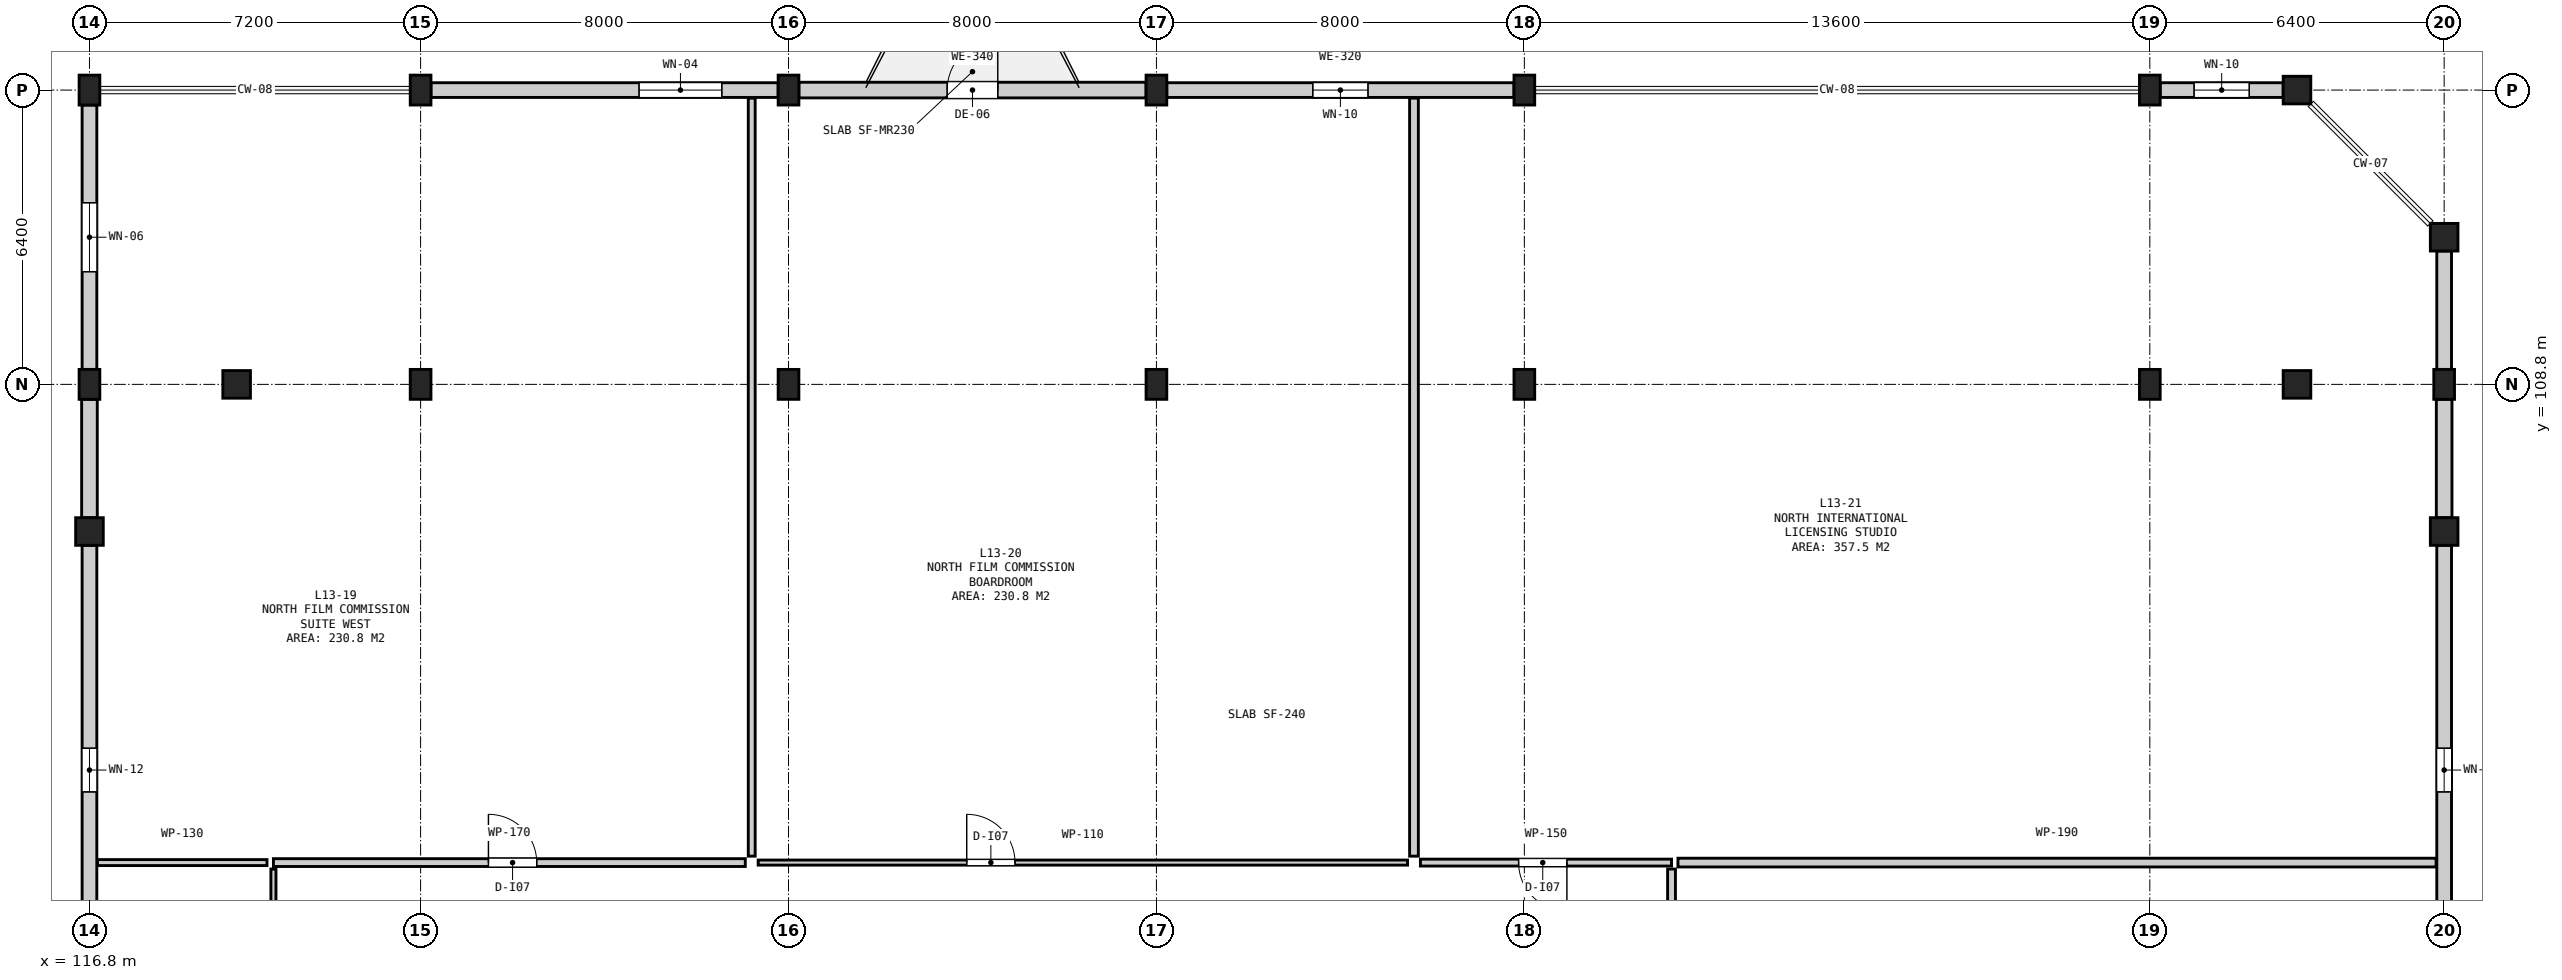
"""IFC4 building model, lengths in metres.
Left out: names, types, materials, properties, quantities, classifications, styles, units other than length and angle.
Written with IfcOpenShell. Run it as: python <this file> out.ifc"""

import sys

from ifc_helpers import new_model, si_unit, direction, frame, frame_2d, origin, origin_2d, place, context, subcontext, project, spatial, rectangle, circle, extrude, element, fill, save


model = new_model("IFC4")
c1 = context("Model", 3, precision=1e-05, world=origin(), true_north=direction((0.0, 1.0)))
c2 = subcontext(c1, "Body", "Model", "MODEL_VIEW")
j1 = project(units=[si_unit("LENGTHUNIT", "METRE"), si_unit("PLANEANGLEUNIT", "RADIAN")], contexts=[c1])
p1 = place(None, origin())
s1 = spatial("IfcSite", under=j1, at=p1, CompositionType="ELEMENT")
p2 = place(p1, origin())
s2 = spatial("IfcBuilding", under=s1, at=p2, CompositionType="ELEMENT")
p3 = place(p2, frame((0.0, 0.0, 54.8)))
s3 = spatial("IfcBuildingStorey", under=s2, at=p3, CompositionType="ELEMENT", Elevation=54.8)
p4 = place(p3, frame((116.8, 105.6, 0.0), z_axis=(0.0, 0.0, 1.0), x_axis=(1.0, 0.0, 0.0)))
e1 = element("IfcColumn", 1, at=p4, inside=s3, PredefinedType="COLUMN", context=c2, shape_type="SweptSolid", body=[
    extrude(circle(Radius=0.3, at=origin_2d()), origin(), (0.0, 0.0, 1.0), 3.9),
])
for number, where, z_axis, x_axis in (
    (2, (116.8, 108.8, 0.0), (0.0, 0.0, 1.0), (1.0, 0.0, 0.0)),
    (3, (116.8, 115.2, 0.0), (0.0, 0.0, 1.0), (1.0, 0.0, 0.0)),
):
    element("IfcColumn", number, at=place(p3, frame(where, z_axis=z_axis, x_axis=x_axis)), inside=s3, PredefinedType="COLUMN", context=c2, shape_type="SweptSolid", body=[
        extrude(rectangle(XDim=0.45, YDim=0.65, at=origin_2d()), origin(), (0.0, 0.0, 1.0), 3.9),
    ])
p5 = place(p3, frame((120.0, 108.8, 0.0), z_axis=(0.0, 0.0, 1.0), x_axis=(1.0, 0.0, 0.0)))
e4 = element("IfcColumn", 4, at=p5, inside=s3, PredefinedType="COLUMN", context=c2, shape_type="SweptSolid", body=[
    extrude(circle(Radius=0.3, at=origin_2d()), origin(), (0.0, 0.0, 1.0), 3.9),
])
for number, where, z_axis, x_axis in (
    (5, (124.0, 108.8, 0.0), (0.0, 0.0, 1.0), (1.0, 0.0, 0.0)),
    (6, (124.0, 115.2, 0.0), (0.0, 0.0, 1.0), (1.0, 0.0, 0.0)),
    (7, (132.0, 108.8, 0.0), (0.0, 0.0, 1.0), (1.0, 0.0, 0.0)),
    (8, (132.0, 115.2, 0.0), (0.0, 0.0, 1.0), (1.0, 0.0, 0.0)),
    (9, (140.0, 108.8, 0.0), (0.0, 0.0, 1.0), (1.0, 0.0, 0.0)),
    (10, (140.0, 115.2, 0.0), (0.0, 0.0, 1.0), (1.0, 0.0, 0.0)),
    (11, (148.0, 108.8, 0.0), (0.0, 0.0, 1.0), (1.0, 0.0, 0.0)),
    (12, (148.0, 115.2, 0.0), (0.0, 0.0, 1.0), (1.0, 0.0, 0.0)),
    (13, (161.6, 108.8, 0.0), (0.0, 0.0, 1.0), (1.0, 0.0, 0.0)),
    (14, (161.6, 115.2, 0.0), (0.0, 0.0, 1.0), (1.0, 0.0, 0.0)),
):
    element("IfcColumn", number, at=place(p3, frame(where, z_axis=z_axis, x_axis=x_axis)), inside=s3, PredefinedType="COLUMN", context=c2, shape_type="SweptSolid", body=[
        extrude(rectangle(XDim=0.45, YDim=0.65, at=origin_2d()), origin(), (0.0, 0.0, 1.0), 3.9),
    ])
for number, where, z_axis, x_axis in (
    (15, (164.8, 108.8, 0.0), (0.0, 0.0, 1.0), (1.0, 0.0, 0.0)),
    (16, (164.8, 115.2, 0.0), (0.0, 0.0, 1.0), (1.0, 0.0, 0.0)),
    (17, (168.0, 105.6, 0.0), (0.0, 0.0, 1.0), (1.0, 0.0, 0.0)),
):
    element("IfcColumn", number, at=place(p3, frame(where, z_axis=z_axis, x_axis=x_axis)), inside=s3, PredefinedType="COLUMN", context=c2, shape_type="SweptSolid", body=[
        extrude(circle(Radius=0.3, at=origin_2d()), origin(), (0.0, 0.0, 1.0), 3.9),
    ])
p6 = place(p3, frame((168.0, 108.8, 0.0), z_axis=(0.0, 0.0, 1.0), x_axis=(1.0, 0.0, 0.0)))
e18 = element("IfcColumn", 18, at=p6, inside=s3, PredefinedType="COLUMN", context=c2, shape_type="SweptSolid", body=[
    extrude(rectangle(XDim=0.45, YDim=0.65, at=origin_2d()), origin(), (0.0, 0.0, 1.0), 3.9),
])
p7 = place(p3, frame((168.0, 112.0, 0.0), z_axis=(0.0, 0.0, 1.0), x_axis=(1.0, 0.0, 0.0)))
e19 = element("IfcColumn", 19, at=p7, inside=s3, PredefinedType="COLUMN", context=c2, shape_type="SweptSolid", body=[
    extrude(circle(Radius=0.3, at=origin_2d()), origin(), (0.0, 0.0, 1.0), 3.9),
])
p8 = place(p3, frame((168.0, 95.525, 0.0), z_axis=(0.0, 0.0, 1.0), x_axis=(0.0, 1.0, 0.0)))
e20 = element("IfcWall", 20, at=p8, inside=s3, PredefinedType="SOLIDWALL", context=c2, shape_type="SweptSolid", body=[
    extrude(rectangle(XDim=9.775, YDim=0.32, at=frame_2d((4.888, 0.0))), origin(), (0.0, 0.0, 1.0), 2.645),
])
p9 = place(p8, frame((4.413, 0.0, 0.8)))
e21 = element("IfcOpeningElement", 21, at=p9, cuts=e20, PredefinedType="OPENING", context=c2, shape_type="SweptSolid", body=[
    extrude(rectangle(XDim=0.95, YDim=1.45, at=frame_2d((0.475, 0.725))), frame((0.0, 0.172, 0.0), z_axis=(0.0, -1.0, 0.0), x_axis=(1.0, 0.0, 0.0)), (0.0, 0.0, 1.0), 0.344),
])
p10 = place(p3, frame((168.0, 105.9, 0.0), z_axis=(0.0, 0.0, 1.0), x_axis=(0.0, 1.0, 0.0)))
e22 = element("IfcWall", 22, at=p10, inside=s3, PredefinedType="SOLIDWALL", context=c2, shape_type="SweptSolid", body=[
    extrude(rectangle(XDim=2.575, YDim=0.34, at=frame_2d((1.288, 0.0))), origin(), (0.0, 0.0, 1.0), 2.645),
])
p11 = place(p3, frame((168.0, 109.125, 0.0), z_axis=(0.0, 0.0, 1.0), x_axis=(0.0, 1.0, 0.0)))
e23 = element("IfcWall", 23, at=p11, inside=s3, PredefinedType="SOLIDWALL", context=c2, shape_type="SweptSolid", body=[
    extrude(rectangle(XDim=2.575, YDim=0.32, at=frame_2d((1.288, 0.0))), origin(), (0.0, 0.0, 1.0), 3.06),
])
p12 = place(p3, frame((164.5, 115.2, 0.0), z_axis=(0.0, 0.0, 1.0), x_axis=(-1.0, 0.0, 0.0)))
e24 = element("IfcWall", 24, at=p12, inside=s3, PredefinedType="SOLIDWALL", context=c2, shape_type="SweptSolid", body=[
    extrude(rectangle(XDim=2.675, YDim=0.32, at=frame_2d((1.337, 0.0))), origin(), (0.0, 0.0, 1.0), 3.06),
])
p13 = place(p12, frame((0.738, 0.0, 0.9)))
e25 = element("IfcOpeningElement", 25, at=p13, cuts=e24, PredefinedType="OPENING", context=c2, shape_type="SweptSolid", body=[
    extrude(rectangle(XDim=1.2, YDim=1.7, at=frame_2d((0.6, 0.85))), frame((0.0, 0.172, 0.0), z_axis=(0.0, -1.0, 0.0), x_axis=(1.0, 0.0, 0.0)), (0.0, 0.0, 1.0), 0.344),
])
p14 = place(p3, frame((147.775, 115.2, 0.0), z_axis=(0.0, 0.0, 1.0), x_axis=(-1.0, 0.0, 0.0)))
e26 = element("IfcWall", 26, at=p14, inside=s3, PredefinedType="SOLIDWALL", context=c2, shape_type="SweptSolid", body=[
    extrude(rectangle(XDim=7.55, YDim=0.32, at=frame_2d((3.775, 0.0))), origin(), (0.0, 0.0, 1.0), 3.06),
])
p15 = place(p14, frame((3.175, 0.0, 0.9)))
e27 = element("IfcOpeningElement", 27, at=p15, cuts=e26, PredefinedType="OPENING", context=c2, shape_type="SweptSolid", body=[
    extrude(rectangle(XDim=1.2, YDim=1.7, at=frame_2d((0.6, 0.85))), frame((0.0, 0.172, 0.0), z_axis=(0.0, -1.0, 0.0), x_axis=(1.0, 0.0, 0.0)), (0.0, 0.0, 1.0), 0.344),
])
p16 = place(p3, frame((139.775, 115.2, 0.0), z_axis=(0.0, 0.0, 1.0), x_axis=(-1.0, 0.0, 0.0)))
e28 = element("IfcWall", 28, at=p16, inside=s3, PredefinedType="SOLIDWALL", context=c2, shape_type="SweptSolid", body=[
    extrude(rectangle(XDim=7.55, YDim=0.34, at=frame_2d((3.775, 0.0))), origin(), (0.0, 0.0, 1.0), 3.06),
])
p17 = place(p16, frame((3.225, 0.0, 0.0)))
e29 = element("IfcOpeningElement", 29, at=p17, cuts=e28, PredefinedType="OPENING", context=c2, shape_type="SweptSolid", body=[
    extrude(rectangle(XDim=1.1, YDim=2.2, at=frame_2d((0.55, 1.1))), frame((0.0, 0.182, 0.0), z_axis=(0.0, -1.0, 0.0), x_axis=(1.0, 0.0, 0.0)), (0.0, 0.0, 1.0), 0.364),
])
p18 = place(p3, frame((131.775, 115.2, 0.0), z_axis=(0.0, 0.0, 1.0), x_axis=(-1.0, 0.0, 0.0)))
e30 = element("IfcWall", 30, at=p18, inside=s3, PredefinedType="SOLIDWALL", context=c2, shape_type="SweptSolid", body=[
    extrude(rectangle(XDim=7.55, YDim=0.32, at=frame_2d((3.775, 0.0))), origin(), (0.0, 0.0, 1.0), 3.045),
])
p19 = place(p18, frame((1.225, 0.0, 0.9)))
e31 = element("IfcOpeningElement", 31, at=p19, cuts=e30, PredefinedType="OPENING", context=c2, shape_type="SweptSolid", body=[
    extrude(rectangle(XDim=1.8, YDim=1.85, at=frame_2d((0.9, 0.925))), frame((0.0, 0.172, 0.0), z_axis=(0.0, -1.0, 0.0), x_axis=(1.0, 0.0, 0.0)), (0.0, 0.0, 1.0), 0.344),
])
p20 = place(p3, frame((116.8, 114.875, 0.0), z_axis=(0.0, 0.0, 1.0), x_axis=(0.0, -1.0, 0.0)))
e32 = element("IfcWall", 32, at=p20, inside=s3, PredefinedType="SOLIDWALL", context=c2, shape_type="SweptSolid", body=[
    extrude(rectangle(XDim=5.75, YDim=0.32, at=frame_2d((2.875, 0.0))), origin(), (0.0, 0.0, 1.0), 3.06),
])
p21 = place(p20, frame((2.125, 0.0, 0.9)))
e33 = element("IfcOpeningElement", 33, at=p21, cuts=e32, PredefinedType="OPENING", context=c2, shape_type="SweptSolid", body=[
    extrude(rectangle(XDim=1.5, YDim=1.85, at=frame_2d((0.75, 0.925))), frame((0.0, 0.172, 0.0), z_axis=(0.0, -1.0, 0.0), x_axis=(1.0, 0.0, 0.0)), (0.0, 0.0, 1.0), 0.344),
])
p22 = place(p3, frame((116.8, 108.475, 0.0), z_axis=(0.0, 0.0, 1.0), x_axis=(0.0, -1.0, 0.0)))
e34 = element("IfcWall", 34, at=p22, inside=s3, PredefinedType="SOLIDWALL", context=c2, shape_type="SweptSolid", body=[
    extrude(rectangle(XDim=2.575, YDim=0.34, at=frame_2d((1.288, 0.0))), origin(), (0.0, 0.0, 1.0), 2.645),
])
p23 = place(p3, frame((116.8, 105.3, 0.0), z_axis=(0.0, 0.0, 1.0), x_axis=(0.0, -1.0, 0.0)))
e35 = element("IfcWall", 35, at=p23, inside=s3, PredefinedType="SOLIDWALL", context=c2, shape_type="SweptSolid", body=[
    extrude(rectangle(XDim=9.775, YDim=0.32, at=frame_2d((4.888, 0.0))), origin(), (0.0, 0.0, 1.0), 2.645),
])
p24 = place(p23, frame((4.413, 0.0, 0.8)))
e36 = element("IfcOpeningElement", 36, at=p24, cuts=e35, PredefinedType="OPENING", context=c2, shape_type="SweptSolid", body=[
    extrude(rectangle(XDim=0.95, YDim=1.45, at=frame_2d((0.475, 0.725))), frame((0.0, 0.172, 0.0), z_axis=(0.0, -1.0, 0.0), x_axis=(1.0, 0.0, 0.0)), (0.0, 0.0, 1.0), 0.344),
])
p25 = place(p3, frame((151.34, 98.4, 0.0), z_axis=(0.0, 0.0, 1.0), x_axis=(1.0, 0.0, 0.0)))
e37 = element("IfcWall", 37, at=p25, inside=s3, PredefinedType="PARTITIONING", context=c2, shape_type="SweptSolid", body=[
    extrude(rectangle(XDim=16.485, YDim=0.19, at=frame_2d((8.242, 0.0))), origin(), (0.0, 0.0, 1.0), 3.62),
])
p26 = place(p3, frame((151.2, 86.54, 0.0), z_axis=(0.0, 0.0, 1.0), x_axis=(0.0, 1.0, 0.0)))
e38 = element("IfcWall", 38, at=p26, inside=s3, PredefinedType="PARTITIONING", context=c2, shape_type="SweptSolid", body=[
    extrude(rectangle(XDim=11.72, YDim=0.17, at=frame_2d((5.86, 0.0))), origin(), (0.0, 0.0, 1.0), 3.62),
])
p27 = place(p26, frame((5.135, 0.0, 0.0)))
e39 = element("IfcOpeningElement", 39, at=p27, cuts=e38, PredefinedType="OPENING", context=c2, shape_type="SweptSolid", body=[
    extrude(rectangle(XDim=1.05, YDim=2.15, at=frame_2d((0.525, 1.075))), frame((0.0, 0.097, 0.0), z_axis=(0.0, -1.0, 0.0), x_axis=(1.0, 0.0, 0.0)), (0.0, 0.0, 1.0), 0.194),
])
p28 = place(p3, frame((116.975, 98.4, 0.0), z_axis=(0.0, 0.0, 1.0), x_axis=(1.0, 0.0, 0.0)))
e40 = element("IfcWall", 40, at=p28, inside=s3, PredefinedType="PARTITIONING", context=c2, shape_type="SweptSolid", body=[
    extrude(rectangle(XDim=3.685, YDim=0.13, at=frame_2d((1.842, 0.0))), origin(), (0.0, 0.0, 1.0), 3.62),
])
p29 = place(p3, frame((120.8, 76.14, 0.0), z_axis=(0.0, 0.0, 1.0), x_axis=(0.0, 1.0, 0.0)))
e41 = element("IfcWall", 41, at=p29, inside=s3, PredefinedType="PARTITIONING", context=c2, shape_type="SweptSolid", body=[
    extrude(rectangle(XDim=22.12, YDim=0.11, at=frame_2d((11.06, 0.0))), origin(), (0.0, 0.0, 1.0), 3.62),
])
p30 = place(p29, frame((6.535, 0.0, 0.0)))
e42 = element("IfcOpeningElement", 42, at=p30, cuts=e41, PredefinedType="OPENING", context=c2, shape_type="SweptSolid", body=[
    extrude(rectangle(XDim=1.05, YDim=2.15, at=frame_2d((0.525, 1.075))), frame((0.0, 0.067, 0.0), z_axis=(0.0, -1.0, 0.0), x_axis=(1.0, 0.0, 0.0)), (0.0, 0.0, 1.0), 0.134),
])
p31 = place(p3, frame((120.8, 98.4, 0.0), z_axis=(0.0, 0.0, 1.0), x_axis=(1.0, 0.0, 0.0)))
e43 = element("IfcWall", 43, at=p31, inside=s3, PredefinedType="PARTITIONING", context=c2, shape_type="SweptSolid", body=[
    extrude(rectangle(XDim=10.26, YDim=0.17, at=frame_2d((5.13, 0.0))), origin(), (0.0, 0.0, 1.0), 3.62),
])
p32 = place(p31, frame((4.675, 0.0, 0.0)))
e44 = element("IfcOpeningElement", 44, at=p32, cuts=e43, PredefinedType="OPENING", context=c2, shape_type="SweptSolid", body=[
    extrude(rectangle(XDim=1.05, YDim=2.15, at=frame_2d((0.525, 1.075))), frame((0.0, 0.097, 0.0), z_axis=(0.0, -1.0, 0.0), x_axis=(1.0, 0.0, 0.0)), (0.0, 0.0, 1.0), 0.194),
])
p33 = place(p3, frame((131.2, 98.54, 0.0), z_axis=(0.0, 0.0, 1.0), x_axis=(0.0, 1.0, 0.0)))
e45 = element("IfcWall", 45, at=p33, inside=s3, PredefinedType="PARTITIONING", context=c2, shape_type="SweptSolid", body=[
    extrude(rectangle(XDim=16.485, YDim=0.15, at=frame_2d((8.242, 0.0))), origin(), (0.0, 0.0, 1.0), 3.62),
])
p34 = place(p3, frame((131.34, 98.4, 0.0), z_axis=(0.0, 0.0, 1.0), x_axis=(1.0, 0.0, 0.0)))
e46 = element("IfcWall", 46, at=p34, inside=s3, PredefinedType="PARTITIONING", context=c2, shape_type="SweptSolid", body=[
    extrude(rectangle(XDim=14.12, YDim=0.11, at=frame_2d((7.06, 0.0))), origin(), (0.0, 0.0, 1.0), 3.62),
])
p35 = place(p34, frame((4.535, 0.0, 0.0)))
e47 = element("IfcOpeningElement", 47, at=p35, cuts=e46, PredefinedType="OPENING", context=c2, shape_type="SweptSolid", body=[
    extrude(rectangle(XDim=1.05, YDim=2.15, at=frame_2d((0.525, 1.075))), frame((0.0, 0.067, 0.0), z_axis=(0.0, -1.0, 0.0), x_axis=(1.0, 0.0, 0.0)), (0.0, 0.0, 1.0), 0.134),
])
p36 = place(p3, frame((145.6, 98.54, 0.0), z_axis=(0.0, 0.0, 1.0), x_axis=(0.0, 1.0, 0.0)))
e48 = element("IfcWall", 48, at=p36, inside=s3, PredefinedType="PARTITIONING", context=c2, shape_type="SweptSolid", body=[
    extrude(rectangle(XDim=16.485, YDim=0.19, at=frame_2d((8.242, 0.0))), origin(), (0.0, 0.0, 1.0), 3.62),
])
p37 = place(p3, frame((145.74, 98.4, 0.0), z_axis=(0.0, 0.0, 1.0), x_axis=(1.0, 0.0, 0.0)))
e49 = element("IfcWall", 49, at=p37, inside=s3, PredefinedType="PARTITIONING", context=c2, shape_type="SweptSolid", body=[
    extrude(rectangle(XDim=5.46, YDim=0.15, at=frame_2d((2.73, 0.0))), origin(), (0.0, 0.0, 1.0), 3.62),
])
p38 = place(p37, frame((2.135, 0.0, 0.0)))
e50 = element("IfcOpeningElement", 50, at=p38, cuts=e49, PredefinedType="OPENING", context=c2, shape_type="SweptSolid", body=[
    extrude(rectangle(XDim=1.05, YDim=2.15, at=frame_2d((0.525, 1.075))), frame((0.0, 0.087, 0.0), z_axis=(0.0, -1.0, 0.0), x_axis=(1.0, 0.0, 0.0)), (0.0, 0.0, 1.0), 0.174),
])
p39 = place(p9, origin())
e51 = element("IfcWindow", 51, at=p39, inside=s3, PartitioningType="SINGLE_PANEL", PredefinedType="WINDOW", context=c2, shape_type="SweptSolid", body=[
    extrude(rectangle(XDim=0.95, YDim=1.45, at=frame_2d((0.475, 0.725))), frame((0.0, 0.03, 0.0), z_axis=(0.0, -1.0, 0.0), x_axis=(1.0, 0.0, 0.0)), (0.0, 0.0, 1.0), 0.06),
])
fill(e21, e51)
p40 = place(p13, origin())
e52 = element("IfcWindow", 52, at=p40, inside=s3, PartitioningType="SINGLE_PANEL", PredefinedType="WINDOW", context=c2, shape_type="SweptSolid", body=[
    extrude(rectangle(XDim=1.2, YDim=1.7, at=frame_2d((0.6, 0.85))), frame((0.0, 0.03, 0.0), z_axis=(0.0, -1.0, 0.0), x_axis=(1.0, 0.0, 0.0)), (0.0, 0.0, 1.0), 0.06),
])
fill(e25, e52)
p41 = place(p15, origin())
e53 = element("IfcWindow", 53, at=p41, inside=s3, PartitioningType="SINGLE_PANEL", PredefinedType="WINDOW", context=c2, shape_type="SweptSolid", body=[
    extrude(rectangle(XDim=1.2, YDim=1.7, at=frame_2d((0.6, 0.85))), frame((0.0, 0.03, 0.0), z_axis=(0.0, -1.0, 0.0), x_axis=(1.0, 0.0, 0.0)), (0.0, 0.0, 1.0), 0.06),
])
fill(e27, e53)
p42 = place(p17, frame((1.1, 0.0, 0.0), z_axis=(0.0, 0.0, 1.0), x_axis=(-1.0, 0.0, 0.0)))
e54 = element("IfcDoor", 54, at=p42, inside=s3, OperationType="SINGLE_SWING_RIGHT", PredefinedType="DOOR", context=c2, shape_type="SweptSolid", body=[
    extrude(rectangle(XDim=1.1, YDim=2.2, at=frame_2d((0.55, 1.1))), frame((0.0, 0.025, 0.0), z_axis=(0.0, -1.0, 0.0), x_axis=(1.0, 0.0, 0.0)), (0.0, 0.0, 1.0), 0.05),
])
fill(e29, e54)
p43 = place(p19, origin())
e55 = element("IfcWindow", 55, at=p43, inside=s3, PartitioningType="DOUBLE_PANEL_VERTICAL", PredefinedType="WINDOW", context=c2, shape_type="SweptSolid", body=[
    extrude(rectangle(XDim=1.8, YDim=1.85, at=frame_2d((0.9, 0.925))), frame((0.0, 0.03, 0.0), z_axis=(0.0, -1.0, 0.0), x_axis=(1.0, 0.0, 0.0)), (0.0, 0.0, 1.0), 0.06),
])
fill(e31, e55)
p44 = place(p21, origin())
e56 = element("IfcWindow", 56, at=p44, inside=s3, PartitioningType="SINGLE_PANEL", PredefinedType="WINDOW", context=c2, shape_type="SweptSolid", body=[
    extrude(rectangle(XDim=1.5, YDim=1.85, at=frame_2d((0.75, 0.925))), frame((0.0, 0.03, 0.0), z_axis=(0.0, -1.0, 0.0), x_axis=(1.0, 0.0, 0.0)), (0.0, 0.0, 1.0), 0.06),
])
fill(e33, e56)
p45 = place(p24, origin())
e57 = element("IfcWindow", 57, at=p45, inside=s3, PartitioningType="SINGLE_PANEL", PredefinedType="WINDOW", context=c2, shape_type="SweptSolid", body=[
    extrude(rectangle(XDim=0.95, YDim=1.45, at=frame_2d((0.475, 0.725))), frame((0.0, 0.03, 0.0), z_axis=(0.0, -1.0, 0.0), x_axis=(1.0, 0.0, 0.0)), (0.0, 0.0, 1.0), 0.06),
])
fill(e36, e57)
p46 = place(p32, origin())
e58 = element("IfcDoor", 58, at=p46, inside=s3, OperationType="SINGLE_SWING_LEFT", PredefinedType="DOOR", context=c2, shape_type="SweptSolid", body=[
    extrude(rectangle(XDim=1.05, YDim=2.15, at=frame_2d((0.525, 1.075))), frame((0.0, 0.025, 0.0), z_axis=(0.0, -1.0, 0.0), x_axis=(1.0, 0.0, 0.0)), (0.0, 0.0, 1.0), 0.05),
])
fill(e44, e58)
p47 = place(p35, origin())
e59 = element("IfcDoor", 59, at=p47, inside=s3, OperationType="SINGLE_SWING_LEFT", PredefinedType="DOOR", context=c2, shape_type="SweptSolid", body=[
    extrude(rectangle(XDim=1.05, YDim=2.15, at=frame_2d((0.525, 1.075))), frame((0.0, 0.025, 0.0), z_axis=(0.0, -1.0, 0.0), x_axis=(1.0, 0.0, 0.0)), (0.0, 0.0, 1.0), 0.05),
])
fill(e47, e59)
p48 = place(p38, frame((1.05, 0.0, 0.0), z_axis=(0.0, 0.0, 1.0), x_axis=(-1.0, 0.0, 0.0)))
e60 = element("IfcDoor", 60, at=p48, inside=s3, OperationType="SINGLE_SWING_LEFT", PredefinedType="DOOR", context=c2, shape_type="SweptSolid", body=[
    extrude(rectangle(XDim=1.05, YDim=2.15, at=frame_2d((0.525, 1.075))), frame((0.0, 0.025, 0.0), z_axis=(0.0, -1.0, 0.0), x_axis=(1.0, 0.0, 0.0)), (0.0, 0.0, 1.0), 0.05),
])
fill(e50, e60)
save(model, sys.argv[1])
